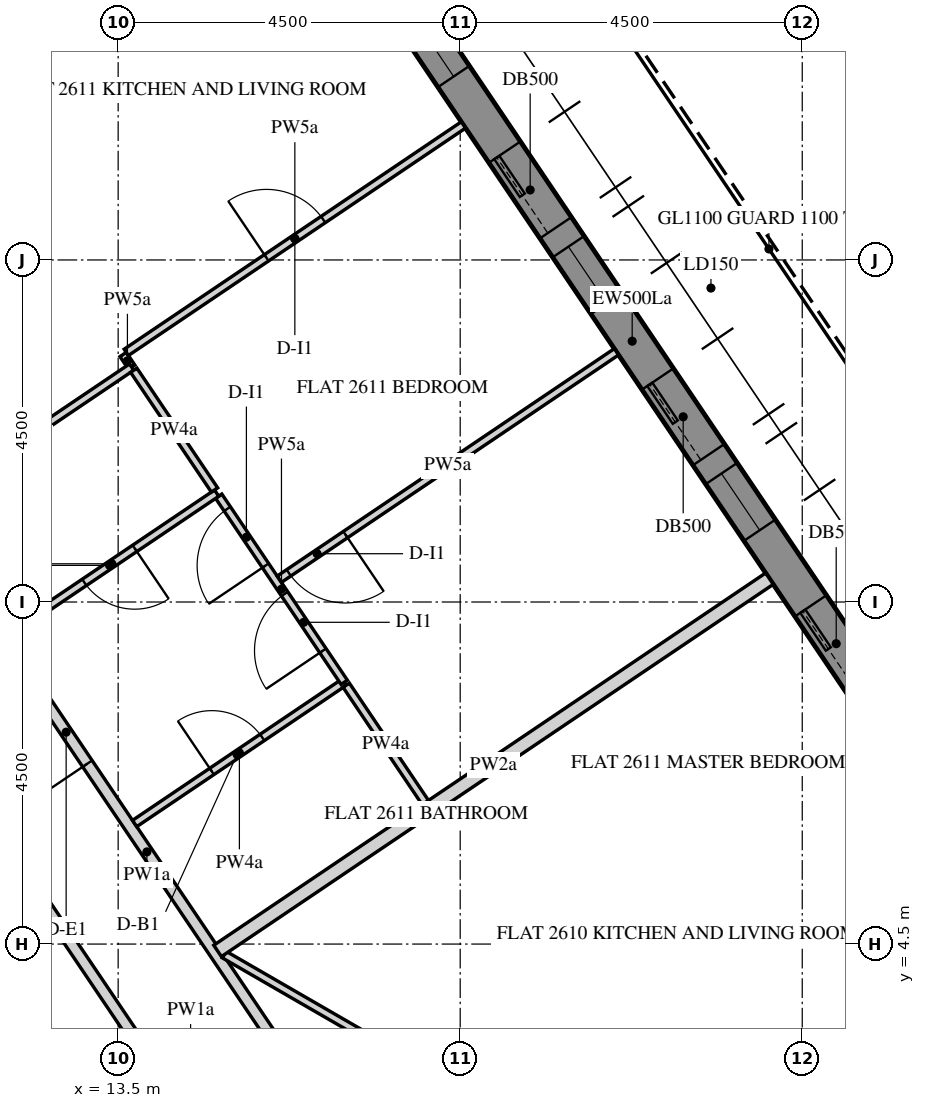
"""IFC4 building model, lengths in metres.
Left out: names, types, materials, properties, quantities, classifications, styles, units other than length and angle.
Written with IfcOpenShell. Run it as: python <this file> out.ifc"""

import sys

from ifc_helpers import new_model, si_unit, direction, frame, frame_2d, origin, place, context, subcontext, project, spatial, polyline, rectangle, outline, extrude, element, fill, save


model = new_model("IFC4")
c1 = context("Model", 3, precision=1e-05, world=origin(), true_north=direction((0.0, 1.0)))
c2 = subcontext(c1, "Body", "Model", "MODEL_VIEW")
j1 = project(units=[si_unit("LENGTHUNIT", "METRE"), si_unit("PLANEANGLEUNIT", "RADIAN")], contexts=[c1])
p1 = place(None, origin())
s1 = spatial("IfcSite", under=j1, at=p1, CompositionType="ELEMENT")
p2 = place(p1, origin())
s2 = spatial("IfcBuilding", under=s1, at=p2, CompositionType="ELEMENT")
p3 = place(p2, frame((0.0, 0.0, 334.2)))
s3 = spatial("IfcBuildingStorey", under=s2, at=p3, CompositionType="ELEMENT", Elevation=334.2)
p4 = place(p3, frame((26.706, 2.879, -0.15), z_axis=(0.0, 0.0, 1.0), x_axis=(-0.559197891507, 0.829034208061, 0.0)))
e1 = element("IfcWall", 1, at=p4, inside=s3, PredefinedType="SOLIDWALL", context=c2, shape_type="SweptSolid", body=[
    extrude(outline(polyline([(0.25, -0.25), (22.795, -0.25), (23.295, 0.25), (-0.25, 0.25), (0.25, -0.25)])), origin(), (0.0, 0.0, 1.0), 3.75),
])
p5 = place(p4, frame((1.323, 0.0, 1.05)))
e2 = element("IfcOpeningElement", 2, at=p5, cuts=e1, PredefinedType="OPENING", context=c2, shape_type="SweptSolid", body=[
    extrude(rectangle(XDim=0.9, YDim=1.5, at=frame_2d((0.45, 0.75))), frame((0.0, 0.26, 0.0), z_axis=(0.0, -1.0, 0.0), x_axis=(1.0, 0.0, 0.0)), (0.0, 0.0, 1.0), 0.52),
])
p6 = place(p4, frame((2.522, 0.0, 0.15)))
e3 = element("IfcOpeningElement", 3, at=p6, cuts=e1, PredefinedType="OPENING", context=c2, shape_type="SweptSolid", body=[
    extrude(rectangle(XDim=1.2, YDim=2.4, at=frame_2d((0.6, 1.2))), frame((0.0, 0.26, 0.0), z_axis=(0.0, -1.0, 0.0), x_axis=(1.0, 0.0, 0.0)), (0.0, 0.0, 1.0), 0.52),
])
p7 = place(p4, frame((4.922, 0.0, 1.05)))
e4 = element("IfcOpeningElement", 4, at=p7, cuts=e1, PredefinedType="OPENING", context=c2, shape_type="SweptSolid", body=[
    extrude(rectangle(XDim=0.9, YDim=1.5, at=frame_2d((0.45, 0.75))), frame((0.0, 0.26, 0.0), z_axis=(0.0, -1.0, 0.0), x_axis=(1.0, 0.0, 0.0)), (0.0, 0.0, 1.0), 0.52),
])
p8 = place(p4, frame((6.122, 0.0, 0.15)))
e5 = element("IfcOpeningElement", 5, at=p8, cuts=e1, PredefinedType="OPENING", context=c2, shape_type="SweptSolid", body=[
    extrude(rectangle(XDim=1.2, YDim=2.4, at=frame_2d((0.6, 1.2))), frame((0.0, 0.26, 0.0), z_axis=(0.0, -1.0, 0.0), x_axis=(1.0, 0.0, 0.0)), (0.0, 0.0, 1.0), 0.52),
])
p9 = place(p4, frame((8.522, 0.0, 1.05)))
e6 = element("IfcOpeningElement", 6, at=p9, cuts=e1, PredefinedType="OPENING", context=c2, shape_type="SweptSolid", body=[
    extrude(rectangle(XDim=0.9, YDim=1.5, at=frame_2d((0.45, 0.75))), frame((0.0, 0.26, 0.0), z_axis=(0.0, -1.0, 0.0), x_axis=(1.0, 0.0, 0.0)), (0.0, 0.0, 1.0), 0.52),
])
p10 = place(p4, frame((9.722, 0.0, 0.15)))
e7 = element("IfcOpeningElement", 7, at=p10, cuts=e1, PredefinedType="OPENING", context=c2, shape_type="SweptSolid", body=[
    extrude(rectangle(XDim=1.2, YDim=2.4, at=frame_2d((0.6, 1.2))), frame((0.0, 0.26, 0.0), z_axis=(0.0, -1.0, 0.0), x_axis=(1.0, 0.0, 0.0)), (0.0, 0.0, 1.0), 0.52),
])
p11 = place(p4, frame((12.122, 0.0, 1.05)))
e8 = element("IfcOpeningElement", 8, at=p11, cuts=e1, PredefinedType="OPENING", context=c2, shape_type="SweptSolid", body=[
    extrude(rectangle(XDim=0.9, YDim=1.5, at=frame_2d((0.45, 0.75))), frame((0.0, 0.26, 0.0), z_axis=(0.0, -1.0, 0.0), x_axis=(1.0, 0.0, 0.0)), (0.0, 0.0, 1.0), 0.52),
])
p12 = place(p4, frame((13.323, 0.0, 0.15)))
e9 = element("IfcOpeningElement", 9, at=p12, cuts=e1, PredefinedType="OPENING", context=c2, shape_type="SweptSolid", body=[
    extrude(rectangle(XDim=1.2, YDim=2.4, at=frame_2d((0.6, 1.2))), frame((0.0, 0.26, 0.0), z_axis=(0.0, -1.0, 0.0), x_axis=(1.0, 0.0, 0.0)), (0.0, 0.0, 1.0), 0.52),
])
p13 = place(p4, frame((15.722, 0.0, 1.05)))
e10 = element("IfcOpeningElement", 10, at=p13, cuts=e1, PredefinedType="OPENING", context=c2, shape_type="SweptSolid", body=[
    extrude(rectangle(XDim=0.9, YDim=1.5, at=frame_2d((0.45, 0.75))), frame((0.0, 0.26, 0.0), z_axis=(0.0, -1.0, 0.0), x_axis=(1.0, 0.0, 0.0)), (0.0, 0.0, 1.0), 0.52),
])
p14 = place(p4, frame((16.922, 0.0, 0.15)))
e11 = element("IfcOpeningElement", 11, at=p14, cuts=e1, PredefinedType="OPENING", context=c2, shape_type="SweptSolid", body=[
    extrude(rectangle(XDim=1.2, YDim=2.4, at=frame_2d((0.6, 1.2))), frame((0.0, 0.26, 0.0), z_axis=(0.0, -1.0, 0.0), x_axis=(1.0, 0.0, 0.0)), (0.0, 0.0, 1.0), 0.52),
])
p15 = place(p4, frame((19.323, 0.0, 1.05)))
e12 = element("IfcOpeningElement", 12, at=p15, cuts=e1, PredefinedType="OPENING", context=c2, shape_type="SweptSolid", body=[
    extrude(rectangle(XDim=0.9, YDim=1.5, at=frame_2d((0.45, 0.75))), frame((0.0, 0.26, 0.0), z_axis=(0.0, -1.0, 0.0), x_axis=(1.0, 0.0, 0.0)), (0.0, 0.0, 1.0), 0.52),
])
p16 = place(p4, frame((20.522, 0.0, 0.15)))
e13 = element("IfcOpeningElement", 13, at=p16, cuts=e1, PredefinedType="OPENING", context=c2, shape_type="SweptSolid", body=[
    extrude(rectangle(XDim=1.2, YDim=2.4, at=frame_2d((0.6, 1.2))), frame((0.0, 0.26, 0.0), z_axis=(0.0, -1.0, 0.0), x_axis=(1.0, 0.0, 0.0)), (0.0, 0.0, 1.0), 0.52),
])
p17 = place(p3, frame((12.471, 0.0, -0.15), z_axis=(0.0, 0.0, 1.0), x_axis=(-0.499996419489, 0.866027470984, 0.0)))
e14 = element("IfcWall", 14, at=p17, inside=s3, PredefinedType="SHEAR", context=c2, shape_type="SweptSolid", body=[
    extrude(outline(polyline([(-0.115, -0.2), (12.586, -0.2), (12.355, 0.2), (0.115, 0.2), (-0.115, -0.2)])), origin(), (0.0, 0.0, 1.0), 3.75),
])
p18 = place(p17, frame((5.306, 0.0, 0.15)))
e15 = element("IfcOpeningElement", 15, at=p18, cuts=e14, PredefinedType="OPENING", context=c2, shape_type="SweptSolid", body=[
    extrude(rectangle(XDim=1.8, YDim=2.4, at=frame_2d((0.9, 1.2))), frame((0.0, 0.21, 0.0), z_axis=(0.0, -1.0, 0.0), x_axis=(1.0, 0.0, 0.0)), (0.0, 0.0, 1.0), 0.42),
])
p19 = place(p3, frame((6.351, 11.0, -0.15), z_axis=(0.0, 0.0, 1.0), x_axis=(0.499998894578, 0.866026041999, 0.0)))
e16 = element("IfcWall", 16, at=p19, inside=s3, PredefinedType="SHEAR", context=c2, shape_type="SweptSolid", body=[
    extrude(rectangle(XDim=15.544, YDim=0.4, at=frame_2d((7.772, 0.0))), origin(), (0.0, 0.0, 1.0), 3.75),
])
p20 = place(p19, frame((6.872, 0.0, 0.15)))
e17 = element("IfcOpeningElement", 17, at=p20, cuts=e16, PredefinedType="OPENING", context=c2, shape_type="SweptSolid", body=[
    extrude(rectangle(XDim=1.8, YDim=2.4, at=frame_2d((0.9, 1.2))), frame((0.0, 0.21, 0.0), z_axis=(0.0, -1.0, 0.0), x_axis=(1.0, 0.0, 0.0)), (0.0, 0.0, 1.0), 0.42),
])
p21 = place(p3, frame((18.521, -1.171, 0.0), z_axis=(0.0, 0.0, 1.0), x_axis=(-0.559191021435, 0.829038842001, 0.0)))
e18 = element("IfcWall", 18, at=p21, inside=s3, PredefinedType="PARTITIONING", context=c2, shape_type="SweptSolid", body=[
    extrude(rectangle(XDim=16.605, YDim=0.15, at=frame_2d((8.303, 0.0))), origin(), (0.0, 0.0, 1.0), 2.838),
])
p22 = place(p21, frame((9.703, 0.0, 0.0)))
e19 = element("IfcOpeningElement", 19, at=p22, cuts=e18, PredefinedType="OPENING", context=c2, shape_type="SweptSolid", body=[
    extrude(rectangle(XDim=1.0, YDim=2.1, at=frame_2d((0.5, 1.05))), frame((0.0, 0.085, 0.0), z_axis=(0.0, -1.0, 0.0), x_axis=(1.0, 0.0, 0.0)), (0.0, 0.0, 1.0), 0.17),
])
p23 = place(p3, frame((9.277, 12.668, 0.0), z_axis=(0.0, 0.0, 1.0), x_axis=(0.499991012162, 0.866030592853, 0.0)))
e20 = element("IfcWall", 20, at=p23, inside=s3, PredefinedType="PARTITIONING", context=c2, shape_type="SweptSolid", body=[
    extrude(rectangle(XDim=7.764, YDim=0.15, at=frame_2d((3.882, 0.0))), origin(), (0.0, 0.0, 1.0), 2.838),
])
p24 = place(p3, frame((12.106, 5.657, 0.0), z_axis=(0.0, 0.0, 1.0), x_axis=(0.559202573837, -0.829031049728, 0.0)))
e21 = element("IfcWall", 21, at=p24, inside=s3, PredefinedType="PARTITIONING", context=c2, shape_type="SweptSolid", body=[
    extrude(rectangle(XDim=8.394, YDim=0.15, at=frame_2d((4.197, 0.0))), origin(), (0.0, 0.0, 1.0), 2.838),
])
p25 = place(p24, frame((3.747, 0.0, 0.0)))
e22 = element("IfcOpeningElement", 22, at=p25, cuts=e21, PredefinedType="OPENING", context=c2, shape_type="SweptSolid", body=[
    extrude(rectangle(XDim=0.9, YDim=2.1, at=frame_2d((0.45, 1.05))), frame((0.0, 0.085, 0.0), z_axis=(0.0, -1.0, 0.0), x_axis=(1.0, 0.0, 0.0)), (0.0, 0.0, 1.0), 0.17),
])
p26 = place(p3, frame((14.896, 4.361, 0.0), z_axis=(0.0, 0.0, 1.0), x_axis=(0.866020874699, -0.500007844523, 0.0)))
e23 = element("IfcWall", 23, at=p26, inside=s3, PredefinedType="PARTITIONING", context=c2, shape_type="SweptSolid", body=[
    extrude(rectangle(XDim=9.38, YDim=0.1, at=frame_2d((4.69, 0.0))), origin(), (0.0, 0.0, 1.0), 2.838),
])
p27 = place(p3, frame((22.069, 9.307, 0.0), z_axis=(0.0, 0.0, 1.0), x_axis=(-0.829040270775, -0.559188903174, 0.0)))
e24 = element("IfcWall", 24, at=p27, inside=s3, PredefinedType="PARTITIONING", context=c2, shape_type="SweptSolid", body=[
    extrude(rectangle(XDim=8.758, YDim=0.18, at=frame_2d((4.379, 0.0))), origin(), (0.0, 0.0, 1.0), 2.838),
])
p28 = place(p3, frame((13.678, 12.089, 0.0), z_axis=(0.0, 0.0, 1.0), x_axis=(-0.559431350648, 0.828876688001, 0.0)))
e25 = element("IfcWall", 25, at=p28, inside=s3, PredefinedType="PARTITIONING", context=c2, shape_type="SweptSolid", body=[
    extrude(rectangle(XDim=0.202, YDim=0.1, at=frame_2d((0.101, 0.0))), origin(), (0.0, 0.0, 1.0), 2.838),
])
p29 = place(p3, frame((13.607, 12.284, 0.0), z_axis=(0.0, 0.0, 1.0), x_axis=(0.829033261565, 0.559199294722, 0.0)))
e26 = element("IfcWall", 26, at=p29, inside=s3, PredefinedType="PARTITIONING", context=c2, shape_type="SweptSolid", body=[
    extrude(rectangle(XDim=5.35, YDim=0.1, at=frame_2d((2.675, 0.0))), origin(), (0.0, 0.0, 1.0), 2.838),
])
p30 = place(p29, frame((2.225, 0.0, 0.0)))
e27 = element("IfcOpeningElement", 27, at=p30, cuts=e26, PredefinedType="OPENING", context=c2, shape_type="SweptSolid", body=[
    extrude(rectangle(XDim=0.9, YDim=2.1, at=frame_2d((0.45, 1.05))), frame((0.0, 0.06, 0.0), z_axis=(0.0, -1.0, 0.0), x_axis=(1.0, 0.0, 0.0)), (0.0, 0.0, 1.0), 0.12),
])
p31 = place(p3, frame((10.921, 10.231, 0.0), z_axis=(0.0, 0.0, 1.0), x_axis=(0.829010378124, 0.559233218759, 0.0)))
e28 = element("IfcWall", 28, at=p31, inside=s3, PredefinedType="PARTITIONING", context=c2, shape_type="SweptSolid", body=[
    extrude(rectangle(XDim=3.325, YDim=0.1, at=frame_2d((1.663, 0.0))), origin(), (0.0, 0.0, 1.0), 2.838),
])
p32 = place(p3, frame((13.717, 6.086, 0.0), z_axis=(0.0, 0.0, 1.0), x_axis=(0.829067379225, 0.559148710725, 0.0)))
e29 = element("IfcWall", 29, at=p32, inside=s3, PredefinedType="PARTITIONING", context=c2, shape_type="SweptSolid", body=[
    extrude(rectangle(XDim=3.325, YDim=0.1, at=frame_2d((1.663, 0.0))), origin(), (0.0, 0.0, 1.0), 2.838),
])
p33 = place(p32, frame((1.225, 0.0, 0.0)))
e30 = element("IfcOpeningElement", 30, at=p33, cuts=e29, PredefinedType="OPENING", context=c2, shape_type="SweptSolid", body=[
    extrude(rectangle(XDim=0.8, YDim=2.1, at=frame_2d((0.4, 1.05))), frame((0.0, 0.06, 0.0), z_axis=(0.0, -1.0, 0.0), x_axis=(1.0, 0.0, 0.0)), (0.0, 0.0, 1.0), 0.12),
])
p34 = place(p3, frame((16.474, 7.944, 0.0), z_axis=(0.0, 0.0, 1.0), x_axis=(-0.559193191328, 0.829037378393, 0.0)))
e31 = element("IfcWall", 31, at=p34, inside=s3, PredefinedType="PARTITIONING", context=c2, shape_type="SweptSolid", body=[
    extrude(rectangle(XDim=2.954, YDim=0.1, at=frame_2d((1.477, 0.0))), origin(), (0.0, 0.0, 1.0), 2.838),
])
p35 = place(p34, frame((0.502, 0.0, 0.0)))
e32 = element("IfcOpeningElement", 32, at=p35, cuts=e31, PredefinedType="OPENING", context=c2, shape_type="SweptSolid", body=[
    extrude(rectangle(XDim=0.9, YDim=2.1, at=frame_2d((0.45, 1.05))), frame((0.0, 0.06, 0.0), z_axis=(0.0, -1.0, 0.0), x_axis=(1.0, 0.0, 0.0)), (0.0, 0.0, 1.0), 0.12),
])
p36 = place(p34, frame((1.852, 0.0, 0.0)))
e33 = element("IfcOpeningElement", 33, at=p36, cuts=e31, PredefinedType="OPENING", context=c2, shape_type="SweptSolid", body=[
    extrude(rectangle(XDim=0.9, YDim=2.1, at=frame_2d((0.45, 1.05))), frame((0.0, 0.06, 0.0), z_axis=(0.0, -1.0, 0.0), x_axis=(1.0, 0.0, 0.0)), (0.0, 0.0, 1.0), 0.12),
])
p37 = place(p3, frame((14.796, 10.433, 0.0), z_axis=(0.0, 0.0, 1.0), x_axis=(-0.82903334026, -0.559199178055, 0.0)))
e34 = element("IfcWall", 34, at=p37, inside=s3, PredefinedType="PARTITIONING", context=c2, shape_type="SweptSolid", body=[
    extrude(rectangle(XDim=3.325, YDim=0.1, at=frame_2d((1.663, 0.0))), origin(), (0.0, 0.0, 1.0), 2.838),
])
p38 = place(p37, frame((1.3, 0.0, 0.0)))
e35 = element("IfcOpeningElement", 35, at=p38, cuts=e34, PredefinedType="OPENING", context=c2, shape_type="SweptSolid", body=[
    extrude(rectangle(XDim=0.8, YDim=2.1, at=frame_2d((0.4, 1.05))), frame((0.0, 0.06, 0.0), z_axis=(0.0, -1.0, 0.0), x_axis=(1.0, 0.0, 0.0)), (0.0, 0.0, 1.0), 0.12),
])
p39 = place(p3, frame((17.541, 6.362, 0.0), z_axis=(0.0, 0.0, 1.0), x_axis=(-0.559110227504, 0.829093332201, 0.0)))
e36 = element("IfcWall", 36, at=p39, inside=s3, PredefinedType="PARTITIONING", context=c2, shape_type="SweptSolid", body=[
    extrude(rectangle(XDim=1.862, YDim=0.1, at=frame_2d((0.931, 0.0))), origin(), (0.0, 0.0, 1.0), 2.838),
])
p40 = place(p3, frame((20.055, 12.292, 0.0), z_axis=(0.0, 0.0, 1.0), x_axis=(-0.829033261565, -0.559199294722, 0.0)))
e37 = element("IfcWall", 37, at=p40, inside=s3, PredefinedType="PARTITIONING", context=c2, shape_type="SweptSolid", body=[
    extrude(rectangle(XDim=5.35, YDim=0.1, at=frame_2d((2.675, 0.0))), origin(), (0.0, 0.0, 1.0), 2.838),
])
p41 = place(p40, frame((4.3, 0.0, 0.0)))
e38 = element("IfcOpeningElement", 38, at=p41, cuts=e37, PredefinedType="OPENING", context=c2, shape_type="SweptSolid", body=[
    extrude(rectangle(XDim=0.9, YDim=2.1, at=frame_2d((0.45, 1.05))), frame((0.0, 0.06, 0.0), z_axis=(0.0, -1.0, 0.0), x_axis=(1.0, 0.0, 0.0)), (0.0, 0.0, 1.0), 0.12),
])
p42 = place(p3, frame((13.705, 12.049, 0.0), z_axis=(0.0, 0.0, 1.0), x_axis=(0.559199178055, -0.82903334026, 0.0)))
e39 = element("IfcWall", 39, at=p42, inside=s3, PredefinedType="PARTITIONING", context=c2, shape_type="SweptSolid", body=[
    extrude(rectangle(XDim=1.9, YDim=0.1, at=frame_2d((0.95, 0.0))), origin(), (0.0, 0.0, 1.0), 2.838),
])
p43 = place(p8, frame((0.0, 0.175, 0.0)))
e40 = element("IfcDoor", 40, at=p43, inside=s3, OperationType="SLIDING_TO_LEFT", PredefinedType="DOOR", context=c2, shape_type="SweptSolid", body=[
    extrude(rectangle(XDim=1.2, YDim=2.4, at=frame_2d((0.6, 1.2))), frame((0.0, 0.025, 0.0), z_axis=(0.0, -1.0, 0.0), x_axis=(1.0, 0.0, 0.0)), (0.0, 0.0, 1.0), 0.05),
])
fill(e5, e40)
p44 = place(p9, frame((0.0, 0.18, 0.0)))
e41 = element("IfcWindow", 41, at=p44, inside=s3, PartitioningType="SINGLE_PANEL", PredefinedType="WINDOW", context=c2, shape_type="SweptSolid", body=[
    extrude(rectangle(XDim=0.9, YDim=1.5, at=frame_2d((0.45, 0.75))), frame((0.0, 0.03, 0.0), z_axis=(0.0, -1.0, 0.0), x_axis=(1.0, 0.0, 0.0)), (0.0, 0.0, 1.0), 0.06),
])
fill(e6, e41)
p45 = place(p10, frame((0.0, 0.175, 0.0)))
e42 = element("IfcDoor", 42, at=p45, inside=s3, OperationType="SLIDING_TO_LEFT", PredefinedType="DOOR", context=c2, shape_type="SweptSolid", body=[
    extrude(rectangle(XDim=1.2, YDim=2.4, at=frame_2d((0.6, 1.2))), frame((0.0, 0.025, 0.0), z_axis=(0.0, -1.0, 0.0), x_axis=(1.0, 0.0, 0.0)), (0.0, 0.0, 1.0), 0.05),
])
fill(e7, e42)
p46 = place(p11, frame((0.0, 0.18, 0.0)))
e43 = element("IfcWindow", 43, at=p46, inside=s3, PartitioningType="SINGLE_PANEL", PredefinedType="WINDOW", context=c2, shape_type="SweptSolid", body=[
    extrude(rectangle(XDim=0.9, YDim=1.5, at=frame_2d((0.45, 0.75))), frame((0.0, 0.03, 0.0), z_axis=(0.0, -1.0, 0.0), x_axis=(1.0, 0.0, 0.0)), (0.0, 0.0, 1.0), 0.06),
])
fill(e8, e43)
p47 = place(p12, frame((0.0, 0.175, 0.0)))
e44 = element("IfcDoor", 44, at=p47, inside=s3, OperationType="SLIDING_TO_LEFT", PredefinedType="DOOR", context=c2, shape_type="SweptSolid", body=[
    extrude(rectangle(XDim=1.2, YDim=2.4, at=frame_2d((0.6, 1.2))), frame((0.0, 0.025, 0.0), z_axis=(0.0, -1.0, 0.0), x_axis=(1.0, 0.0, 0.0)), (0.0, 0.0, 1.0), 0.05),
])
fill(e9, e44)
p48 = place(p13, frame((0.0, 0.18, 0.0)))
e45 = element("IfcWindow", 45, at=p48, inside=s3, PartitioningType="SINGLE_PANEL", PredefinedType="WINDOW", context=c2, shape_type="SweptSolid", body=[
    extrude(rectangle(XDim=0.9, YDim=1.5, at=frame_2d((0.45, 0.75))), frame((0.0, 0.03, 0.0), z_axis=(0.0, -1.0, 0.0), x_axis=(1.0, 0.0, 0.0)), (0.0, 0.0, 1.0), 0.06),
])
fill(e10, e45)
p49 = place(p22, origin())
e46 = element("IfcDoor", 46, at=p49, inside=s3, OperationType="SINGLE_SWING_RIGHT", PredefinedType="DOOR", context=c2, shape_type="SweptSolid", body=[
    extrude(rectangle(XDim=1.0, YDim=2.1, at=frame_2d((0.5, 1.05))), frame((0.0, 0.025, 0.0), z_axis=(0.0, -1.0, 0.0), x_axis=(1.0, 0.0, 0.0)), (0.0, 0.0, 1.0), 0.05),
])
fill(e19, e46)
p50 = place(p33, origin())
e47 = element("IfcDoor", 47, at=p50, inside=s3, OperationType="SINGLE_SWING_RIGHT", PredefinedType="DOOR", context=c2, shape_type="SweptSolid", body=[
    extrude(rectangle(XDim=0.8, YDim=2.1, at=frame_2d((0.4, 1.05))), frame((0.0, 0.025, 0.0), z_axis=(0.0, -1.0, 0.0), x_axis=(1.0, 0.0, 0.0)), (0.0, 0.0, 1.0), 0.05),
])
fill(e30, e47)
p51 = place(p35, origin())
e48 = element("IfcDoor", 48, at=p51, inside=s3, OperationType="SINGLE_SWING_LEFT", PredefinedType="DOOR", context=c2, shape_type="SweptSolid", body=[
    extrude(rectangle(XDim=0.9, YDim=2.1, at=frame_2d((0.45, 1.05))), frame((0.0, 0.025, 0.0), z_axis=(0.0, -1.0, 0.0), x_axis=(1.0, 0.0, 0.0)), (0.0, 0.0, 1.0), 0.05),
])
fill(e32, e48)
p52 = place(p41, origin())
e49 = element("IfcDoor", 49, at=p52, inside=s3, OperationType="SINGLE_SWING_RIGHT", PredefinedType="DOOR", context=c2, shape_type="SweptSolid", body=[
    extrude(rectangle(XDim=0.9, YDim=2.1, at=frame_2d((0.45, 1.05))), frame((0.0, 0.025, 0.0), z_axis=(0.0, -1.0, 0.0), x_axis=(1.0, 0.0, 0.0)), (0.0, 0.0, 1.0), 0.05),
])
fill(e38, e49)
p53 = place(p36, origin())
e50 = element("IfcDoor", 50, at=p53, inside=s3, OperationType="SINGLE_SWING_RIGHT", PredefinedType="DOOR", context=c2, shape_type="SweptSolid", body=[
    extrude(rectangle(XDim=0.9, YDim=2.1, at=frame_2d((0.45, 1.05))), frame((0.0, 0.025, 0.0), z_axis=(0.0, -1.0, 0.0), x_axis=(1.0, 0.0, 0.0)), (0.0, 0.0, 1.0), 0.05),
])
fill(e33, e50)
p54 = place(p38, origin())
e51 = element("IfcDoor", 51, at=p54, inside=s3, OperationType="SINGLE_SWING_LEFT", PredefinedType="DOOR", context=c2, shape_type="SweptSolid", body=[
    extrude(rectangle(XDim=0.8, YDim=2.1, at=frame_2d((0.4, 1.05))), frame((0.0, 0.025, 0.0), z_axis=(0.0, -1.0, 0.0), x_axis=(1.0, 0.0, 0.0)), (0.0, 0.0, 1.0), 0.05),
])
fill(e35, e51)
p55 = place(p30, origin())
e52 = element("IfcDoor", 52, at=p55, inside=s3, OperationType="SINGLE_SWING_RIGHT", PredefinedType="DOOR", context=c2, shape_type="SweptSolid", body=[
    extrude(rectangle(XDim=0.9, YDim=2.1, at=frame_2d((0.45, 1.05))), frame((0.0, 0.025, 0.0), z_axis=(0.0, -1.0, 0.0), x_axis=(1.0, 0.0, 0.0)), (0.0, 0.0, 1.0), 0.05),
])
fill(e27, e52)
save(model, sys.argv[1])
